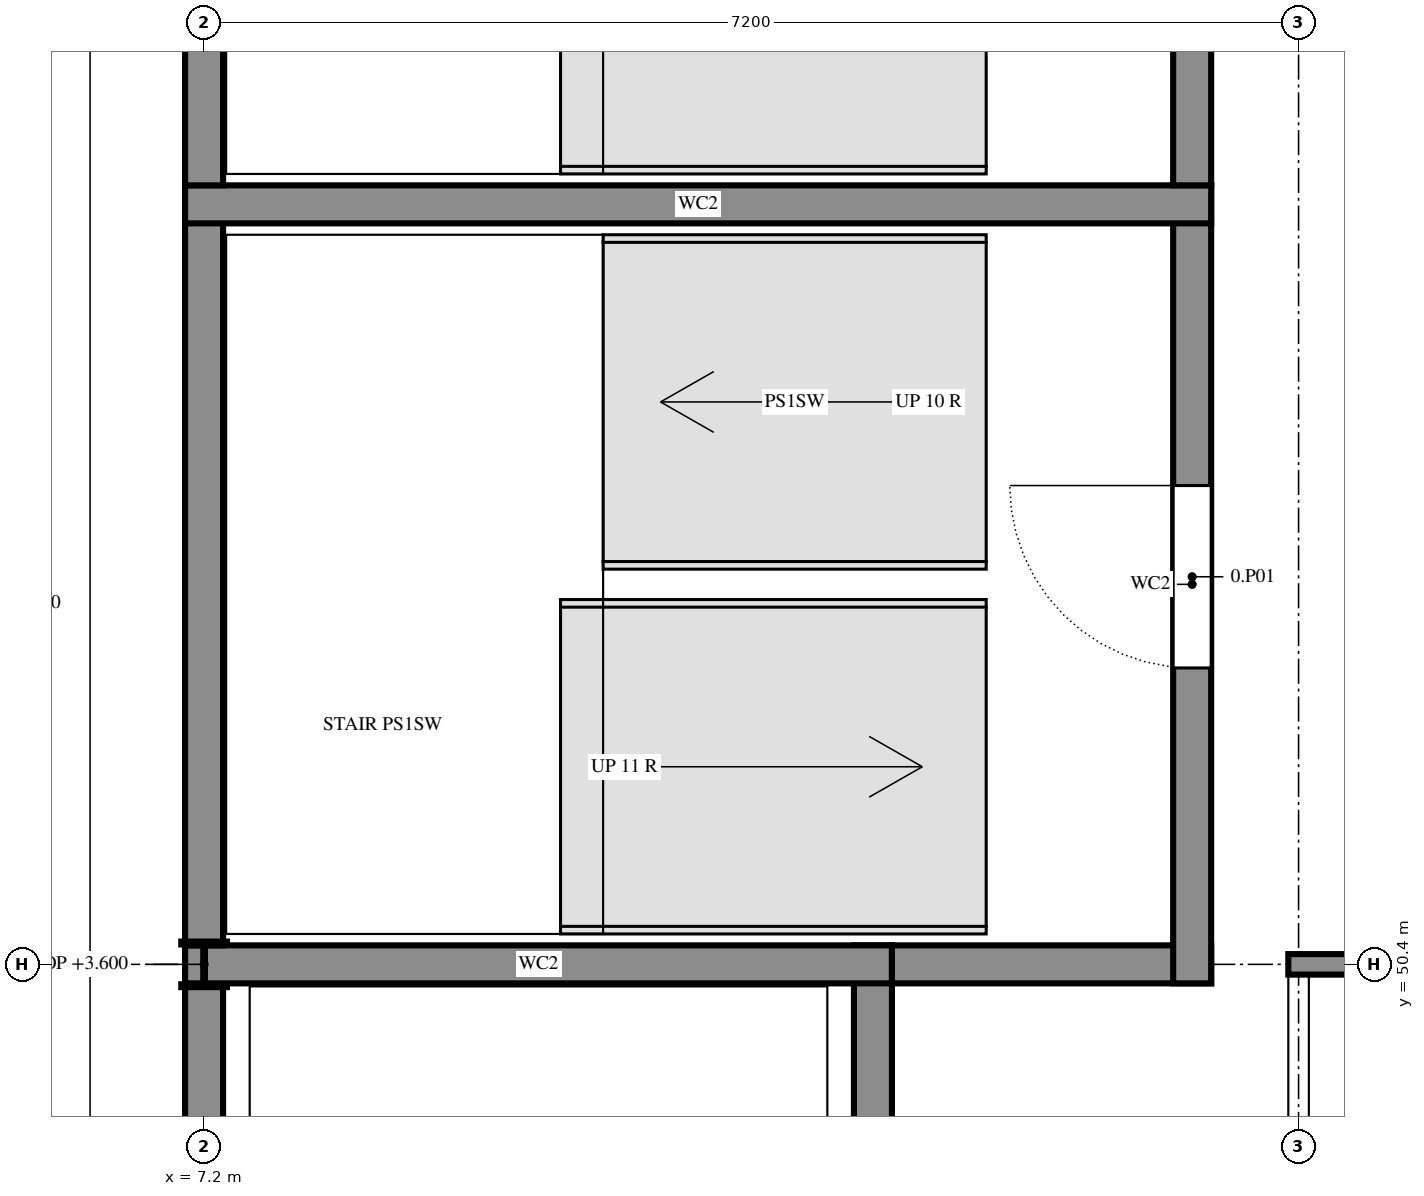
"""IFC4 building model, lengths in metres.
Left out: names, types, materials, properties, quantities, classifications, styles, units other than length and angle.
Written with IfcOpenShell. Run it as: python <this file> out.ifc"""

import sys

from ifc_helpers import new_model, si_unit, direction, frame, frame_2d, origin, origin_2d, place, context, subcontext, project, spatial, rectangle, i_section, extrude, element, fill, save


model = new_model("IFC4")
c1 = context("Model", 3, precision=1e-05, world=origin(), true_north=direction((0.0, 1.0)))
c2 = subcontext(c1, "Body", "Model", "MODEL_VIEW")
j1 = project(units=[si_unit("LENGTHUNIT", "METRE"), si_unit("PLANEANGLEUNIT", "RADIAN")], contexts=[c1])
p1 = place(None, origin())
s1 = spatial("IfcSite", under=j1, at=p1, CompositionType="ELEMENT")
p2 = place(p1, origin())
s2 = spatial("IfcBuilding", under=s1, at=p2, CompositionType="ELEMENT")
p3 = place(p2, origin())
s3 = spatial("IfcBuildingStorey", under=s2, at=p3, CompositionType="ELEMENT", Elevation=0.0)
p4 = place(p3, frame((7.2, 50.4, -0.3), z_axis=(0.0, 0.0, 1.0), x_axis=(1.0, 0.0, 0.0)))
e1 = element("IfcColumn", 1, at=p4, inside=s3, PredefinedType="COLUMN", context=c2, shape_type="SweptSolid", body=[
    extrude(i_section(OverallWidth=0.3, OverallDepth=0.3, WebThickness=0.011, FlangeThickness=0.019, FilletRadius=0.027, at=origin_2d()), origin(), (0.0, 0.0, 1.0), 3.9),
])
p5 = place(p3, frame((11.6, 44.275, 0.0), z_axis=(0.0, 0.0, 1.0), x_axis=(0.0, 1.0, 0.0)))
e2 = element("IfcWall", 2, at=p5, inside=s3, PredefinedType="SHEAR", context=c2, shape_type="SweptSolid", body=[
    extrude(rectangle(XDim=6.25, YDim=0.25, at=frame_2d((3.125, 0.0))), origin(), (0.0, 0.0, 1.0), 3.6),
])
p6 = place(p5, frame((0.375, 0.0, 0.0)))
e3 = element("IfcOpeningElement", 3, at=p6, cuts=e2, PredefinedType="OPENING", context=c2, shape_type="SweptSolid", body=[
    extrude(rectangle(XDim=1.0, YDim=2.4, at=frame_2d((0.5, 1.2))), frame((0.0, 0.135, 0.0), z_axis=(0.0, -1.0, 0.0), x_axis=(1.0, 0.0, 0.0)), (0.0, 0.0, 1.0), 0.27),
])
p7 = place(p3, frame((7.2, 50.525, 0.0), z_axis=(0.0, 0.0, 1.0), x_axis=(0.0, -1.0, 0.0)))
e4 = element("IfcWall", 4, at=p7, inside=s3, PredefinedType="SHEAR", context=c2, shape_type="SweptSolid", body=[
    extrude(rectangle(XDim=6.25, YDim=0.25, at=frame_2d((3.125, 0.0))), origin(), (0.0, 0.0, 1.0), 3.6),
])
p8 = place(p3, frame((11.725, 50.4, 0.0), z_axis=(0.0, 0.0, 1.0), x_axis=(-1.0, 0.0, 0.0)))
e5 = element("IfcWall", 5, at=p8, inside=s3, PredefinedType="SHEAR", context=c2, shape_type="SweptSolid", body=[
    extrude(rectangle(XDim=4.65, YDim=0.25, at=frame_2d((2.325, 0.0))), origin(), (0.0, 0.0, 1.0), 3.6),
])
p9 = place(p3, frame((11.725, 50.4, 0.0), z_axis=(0.0, 0.0, 1.0), x_axis=(1.0, 0.0, 0.0)))
e6 = element("IfcWall", 6, at=p9, inside=s3, PredefinedType="SHEAR", context=c2, shape_type="SweptSolid", body=[
    extrude(rectangle(XDim=2.1, YDim=0.25, at=frame_2d((1.05, 0.0))), origin(), (0.0, 0.0, 1.0), 3.6),
])
p10 = place(p3, frame((13.7, 50.275, 0.0), z_axis=(0.0, 0.0, 1.0), x_axis=(0.0, 1.0, 0.0)))
e7 = element("IfcWall", 7, at=p10, inside=s3, PredefinedType="SHEAR", context=c2, shape_type="SweptSolid", body=[
    extrude(rectangle(XDim=5.25, YDim=0.25, at=frame_2d((2.625, 0.0))), origin(), (0.0, 0.0, 1.0), 3.6),
])
p11 = place(p10, frame((2.075, 0.0, 0.0)))
e8 = element("IfcOpeningElement", 8, at=p11, cuts=e7, PredefinedType="OPENING", context=c2, shape_type="SweptSolid", body=[
    extrude(rectangle(XDim=1.2, YDim=2.4, at=frame_2d((0.6, 1.2))), frame((0.0, 0.135, 0.0), z_axis=(0.0, -1.0, 0.0), x_axis=(1.0, 0.0, 0.0)), (0.0, 0.0, 1.0), 0.27),
])
p12 = place(p3, frame((7.2, 55.525, 0.0), z_axis=(0.0, 0.0, 1.0), x_axis=(0.0, -1.0, 0.0)))
e9 = element("IfcWall", 9, at=p12, inside=s3, PredefinedType="SHEAR", context=c2, shape_type="SweptSolid", body=[
    extrude(rectangle(XDim=5.0, YDim=0.25, at=frame_2d((2.5, 0.0))), origin(), (0.0, 0.0, 1.0), 3.6),
])
p13 = place(p3, frame((13.825, 55.4, 0.0), z_axis=(0.0, 0.0, 1.0), x_axis=(-1.0, 0.0, 0.0)))
e10 = element("IfcWall", 10, at=p13, inside=s3, PredefinedType="SHEAR", context=c2, shape_type="SweptSolid", body=[
    extrude(rectangle(XDim=6.75, YDim=0.25, at=frame_2d((3.375, 0.0))), origin(), (0.0, 0.0, 1.0), 3.6),
])
p14 = place(p3, frame((13.7, 55.525, 0.0), z_axis=(0.0, 0.0, 1.0), x_axis=(0.0, 1.0, 0.0)))
e11 = element("IfcWall", 11, at=p14, inside=s3, PredefinedType="SHEAR", context=c2, shape_type="SweptSolid", body=[
    extrude(rectangle(XDim=5.0, YDim=0.25, at=frame_2d((2.5, 0.0))), origin(), (0.0, 0.0, 1.0), 3.6),
])
p15 = place(p14, frame((1.75, 0.0, 0.0)))
e12 = element("IfcOpeningElement", 12, at=p15, cuts=e11, PredefinedType="OPENING", context=c2, shape_type="SweptSolid", body=[
    extrude(rectangle(XDim=1.2, YDim=2.4, at=frame_2d((0.6, 1.2))), frame((0.0, 0.135, 0.0), z_axis=(0.0, -1.0, 0.0), x_axis=(1.0, 0.0, 0.0)), (0.0, 0.0, 1.0), 0.27),
])
p16 = place(p3, frame((7.2, 60.525, 0.0), z_axis=(0.0, 0.0, 1.0), x_axis=(0.0, -1.0, 0.0)))
e13 = element("IfcWall", 13, at=p16, inside=s3, PredefinedType="SHEAR", context=c2, shape_type="SweptSolid", body=[
    extrude(rectangle(XDim=5.0, YDim=0.25, at=frame_2d((2.5, 0.0))), origin(), (0.0, 0.0, 1.0), 3.6),
])
p17 = place(p3, frame((14.4, 50.333, 0.0), z_axis=(0.0, 0.0, 1.0), x_axis=(0.0, -1.0, 0.0)))
e14 = element("IfcWall", 14, at=p17, inside=s3, PredefinedType="PARTITIONING", context=c2, shape_type="SweptSolid", body=[
    extrude(rectangle(XDim=14.443, YDim=0.135, at=frame_2d((7.221, 0.0))), origin(), (0.0, 0.0, 1.0), 3.12),
])
p18 = place(p17, frame((9.45, 0.0, 0.0)))
e15 = element("IfcOpeningElement", 15, at=p18, cuts=e14, PredefinedType="OPENING", context=c2, shape_type="SweptSolid", body=[
    extrude(rectangle(XDim=1.8, YDim=2.4, at=frame_2d((0.9, 1.2))), frame((0.0, 0.077, 0.0), z_axis=(0.0, -1.0, 0.0), x_axis=(1.0, 0.0, 0.0)), (0.0, 0.0, 1.0), 0.155),
])
p19 = place(p3, frame((18.0, 50.4, 0.0), z_axis=(0.0, 0.0, 1.0), x_axis=(-1.0, 0.0, 0.0)))
e16 = element("IfcWall", 16, at=p19, inside=s3, PredefinedType="PARTITIONING", context=c2, shape_type="SweptSolid", body=[
    extrude(rectangle(XDim=3.667, YDim=0.135, at=frame_2d((1.834, 0.0))), origin(), (0.0, 0.0, 1.0), 3.09),
])
p20 = place(p19, frame((0.95, 0.0, 0.0)))
e17 = element("IfcOpeningElement", 17, at=p20, cuts=e16, PredefinedType="OPENING", context=c2, shape_type="SweptSolid", body=[
    extrude(rectangle(XDim=1.8, YDim=2.4, at=frame_2d((0.9, 1.2))), frame((0.0, 0.077, 0.0), z_axis=(0.0, -1.0, 0.0), x_axis=(1.0, 0.0, 0.0)), (0.0, 0.0, 1.0), 0.155),
])
p21 = place(p11, origin())
e18 = element("IfcDoor", 18, at=p21, inside=s3, OperationType="SINGLE_SWING_LEFT", PredefinedType="DOOR", context=c2, shape_type="SweptSolid", body=[
    extrude(rectangle(XDim=1.2, YDim=2.4, at=frame_2d((0.6, 1.2))), frame((0.0, 0.025, 0.0), z_axis=(0.0, -1.0, 0.0), x_axis=(1.0, 0.0, 0.0)), (0.0, 0.0, 1.0), 0.05),
])
fill(e8, e18)
save(model, sys.argv[1])
